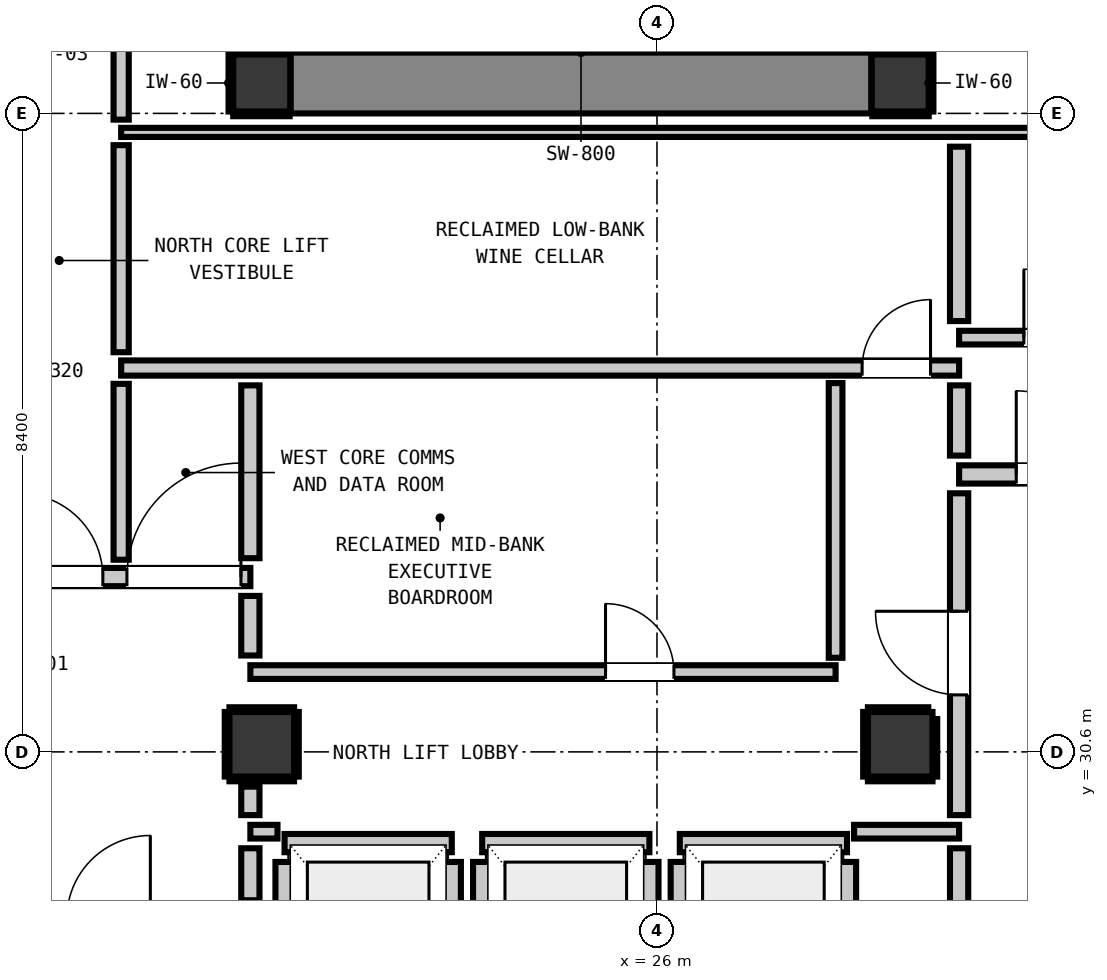
"""IFC4 building model, lengths in metres.
Left out: names, types, materials, properties, quantities, classifications, styles, units other than length and angle.
Written with IfcOpenShell. Run it as: python <this file> out.ifc"""

import sys

from ifc_helpers import new_model, si_unit, direction, frame, frame_2d, origin, origin_2d, place, context, subcontext, project, spatial, rectangle, extrude, element, fill, save


model = new_model("IFC4")
c1 = context("Model", 3, precision=1e-05, world=origin(), true_north=direction((0.0, 1.0)))
c2 = subcontext(c1, "Body", "Model", "MODEL_VIEW")
j1 = project(units=[si_unit("LENGTHUNIT", "METRE"), si_unit("PLANEANGLEUNIT", "RADIAN")], contexts=[c1])
p1 = place(None, origin())
s1 = spatial("IfcSite", under=j1, at=p1, CompositionType="ELEMENT")
p2 = place(p1, origin())
s2 = spatial("IfcBuilding", under=s1, at=p2, CompositionType="ELEMENT")
p3 = place(p2, frame((0.0, 0.0, 262.24)))
s3 = spatial("IfcBuildingStorey", under=s2, at=p3, CompositionType="ELEMENT", Elevation=262.24)
for number, where, z_axis, x_axis in (
    (1, (20.8, 39.4, 0.0), (0.0, 0.0, 1.0), (1.0, 0.0, 0.0)),
    (2, (29.2, 39.4, 0.0), (0.0, 0.0, 1.0), (1.0, 0.0, 0.0)),
):
    element("IfcColumn", number, at=place(p3, frame(where, z_axis=z_axis, x_axis=x_axis)), inside=s3, PredefinedType="COLUMN", context=c2, shape_type="SweptSolid", body=[
        extrude(rectangle(XDim=0.75, YDim=0.75, at=origin_2d()), origin(), (0.0, 0.0, 1.0), 3.32),
    ])
p4 = place(p3, frame((21.18, 39.4, 0.0), z_axis=(0.0, 0.0, 1.0), x_axis=(1.0, 0.0, 0.0)))
e3 = element("IfcWall", 3, at=p4, inside=s3, PredefinedType="SHEAR", context=c2, shape_type="SweptSolid", body=[
    extrude(rectangle(XDim=7.64, YDim=0.8, at=frame_2d((3.82, 0.0))), origin(), (0.0, 0.0, 1.0), 3.32),
])
for number, where, z_axis, x_axis in (
    (4, (20.8, 30.7, 0.0), (0.0, 0.0, 1.0), (1.0, 0.0, 0.0)),
    (5, (29.2, 30.7, 0.0), (0.0, 0.0, 1.0), (1.0, 0.0, 0.0)),
):
    element("IfcColumn", number, at=place(p3, frame(where, z_axis=z_axis, x_axis=x_axis)), inside=s3, PredefinedType="COLUMN", context=c2, shape_type="SweptSolid", body=[
        extrude(rectangle(XDim=0.85, YDim=0.85, at=origin_2d()), origin(), (0.0, 0.0, 1.0), 3.32),
    ])
p5 = place(p3, frame((21.1, 29.4, 0.0), z_axis=(0.0, 0.0, 1.0), x_axis=(1.0, 0.0, 0.0)))
e6 = element("IfcWall", 6, at=p5, inside=s3, PredefinedType="PARTITIONING", context=c2, shape_type="SweptSolid", body=[
    extrude(rectangle(XDim=2.2, YDim=0.24, at=frame_2d((1.1, 0.0))), origin(), (0.0, 0.0, 1.0), 3.1),
])
p6 = place(p3, frame((21.1, 27.048, 0.0), z_axis=(0.0, 0.0, 1.0), x_axis=(0.0, 1.0, 0.0)))
e7 = element("IfcWall", 7, at=p6, inside=s3, PredefinedType="PARTITIONING", context=c2, shape_type="SweptSolid", body=[
    extrude(rectangle(XDim=2.104, YDim=0.24, at=frame_2d((1.052, 0.0))), origin(), (0.0, 0.0, 1.0), 2.335),
])
p7 = place(p3, frame((23.3, 27.048, 0.0), z_axis=(0.0, 0.0, 1.0), x_axis=(0.0, 1.0, 0.0)))
e8 = element("IfcWall", 8, at=p7, inside=s3, PredefinedType="PARTITIONING", context=c2, shape_type="SweptSolid", body=[
    extrude(rectangle(XDim=2.104, YDim=0.24, at=frame_2d((1.052, 0.0))), origin(), (0.0, 0.0, 1.0), 3.1),
])
p8 = place(p3, frame((23.7, 29.4, 0.0), z_axis=(0.0, 0.0, 1.0), x_axis=(1.0, 0.0, 0.0)))
e9 = element("IfcWall", 9, at=p8, inside=s3, PredefinedType="PARTITIONING", context=c2, shape_type="SweptSolid", body=[
    extrude(rectangle(XDim=2.2, YDim=0.24, at=frame_2d((1.1, 0.0))), origin(), (0.0, 0.0, 1.0), 3.1),
])
for number, where, z_axis, x_axis in (
    (10, (23.7, 27.048, 0.0), (0.0, 0.0, 1.0), (0.0, 1.0, 0.0)),
    (11, (25.9, 27.048, 0.0), (0.0, 0.0, 1.0), (0.0, 1.0, 0.0)),
):
    element("IfcWall", number, at=place(p3, frame(where, z_axis=z_axis, x_axis=x_axis)), inside=s3, PredefinedType="PARTITIONING", context=c2, shape_type="SweptSolid", body=[
        extrude(rectangle(XDim=2.104, YDim=0.24, at=frame_2d((1.052, 0.0))), origin(), (0.0, 0.0, 1.0), 3.1),
    ])
p9 = place(p3, frame((26.3, 29.4, 0.0), z_axis=(0.0, 0.0, 1.0), x_axis=(1.0, 0.0, 0.0)))
e12 = element("IfcWall", 12, at=p9, inside=s3, PredefinedType="PARTITIONING", context=c2, shape_type="SweptSolid", body=[
    extrude(rectangle(XDim=2.2, YDim=0.24, at=frame_2d((1.1, 0.0))), origin(), (0.0, 0.0, 1.0), 3.1),
])
p10 = place(p3, frame((26.3, 27.048, 0.0), z_axis=(0.0, 0.0, 1.0), x_axis=(0.0, 1.0, 0.0)))
e13 = element("IfcWall", 13, at=p10, inside=s3, PredefinedType="PARTITIONING", context=c2, shape_type="SweptSolid", body=[
    extrude(rectangle(XDim=2.104, YDim=0.24, at=frame_2d((1.052, 0.0))), origin(), (0.0, 0.0, 1.0), 3.1),
])
p11 = place(p3, frame((28.5, 27.33, 0.0), z_axis=(0.0, 0.0, 1.0), x_axis=(0.0, 1.0, 0.0)))
e14 = element("IfcWall", 14, at=p11, inside=s3, PredefinedType="PARTITIONING", context=c2, shape_type="SweptSolid", body=[
    extrude(rectangle(XDim=1.822, YDim=0.24, at=frame_2d((0.911, 0.0))), origin(), (0.0, 0.0, 1.0), 3.1),
])
p12 = place(p3, frame((17.45, 32.9, 0.0), z_axis=(0.0, 0.0, 1.0), x_axis=(1.0, 0.0, 0.0)))
e15 = element("IfcWall", 15, at=p12, inside=s3, PredefinedType="PARTITIONING", context=c2, shape_type="SweptSolid", body=[
    extrude(rectangle(XDim=3.2, YDim=0.24, at=frame_2d((1.6, 0.0))), origin(), (0.0, 0.0, 1.0), 3.1),
])
p13 = place(p12, frame((0.159, 0.0, 0.0)))
e16 = element("IfcOpeningElement", 16, at=p13, cuts=e15, PredefinedType="OPENING", context=c2, shape_type="SweptSolid", body=[
    extrude(rectangle(XDim=1.1, YDim=2.15, at=frame_2d((0.55, 1.075))), frame((0.0, 0.13, 0.0), z_axis=(0.0, -1.0, 0.0), x_axis=(1.0, 0.0, 0.0)), (0.0, 0.0, 1.0), 0.26),
])
p14 = place(p12, frame((1.576, 0.0, 0.0)))
e17 = element("IfcOpeningElement", 17, at=p14, cuts=e15, PredefinedType="OPENING", context=c2, shape_type="SweptSolid", body=[
    extrude(rectangle(XDim=1.5, YDim=2.15, at=frame_2d((0.75, 1.075))), frame((0.0, 0.13, 0.0), z_axis=(0.0, -1.0, 0.0), x_axis=(1.0, 0.0, 0.0)), (0.0, 0.0, 1.0), 0.26),
])
p15 = place(p3, frame((29.975, 34.25, 0.0), z_axis=(0.0, 0.0, 1.0), x_axis=(1.0, 0.0, 0.0)))
e18 = element("IfcWall", 18, at=p15, inside=s3, PredefinedType="PARTITIONING", context=c2, shape_type="SweptSolid", body=[
    extrude(rectangle(XDim=2.475, YDim=0.24, at=frame_2d((1.237, 0.0))), origin(), (0.0, 0.0, 1.0), 3.1),
])
p16 = place(p15, frame((0.752, 0.0, 0.0)))
e19 = element("IfcOpeningElement", 19, at=p16, cuts=e18, PredefinedType="OPENING", context=c2, shape_type="SweptSolid", body=[
    extrude(rectangle(XDim=1.1, YDim=2.15, at=frame_2d((0.55, 1.075))), frame((0.0, 0.13, 0.0), z_axis=(0.0, -1.0, 0.0), x_axis=(1.0, 0.0, 0.0)), (0.0, 0.0, 1.0), 0.26),
])
p17 = place(p3, frame((18.95, 35.65, 0.0), z_axis=(0.0, 0.0, 1.0), x_axis=(1.0, 0.0, 0.0)))
e20 = element("IfcWall", 20, at=p17, inside=s3, PredefinedType="PARTITIONING", context=c2, shape_type="SweptSolid", body=[
    extrude(rectangle(XDim=11.025, YDim=0.2, at=frame_2d((5.513, 0.0))), origin(), (0.0, 0.0, 1.0), 3.1),
])
p18 = place(p17, frame((9.749, 0.0, 0.0)))
e21 = element("IfcOpeningElement", 21, at=p18, cuts=e20, PredefinedType="OPENING", context=c2, shape_type="SweptSolid", body=[
    extrude(rectangle(XDim=0.9, YDim=2.1, at=frame_2d((0.45, 1.05))), frame((0.0, 0.11, 0.0), z_axis=(0.0, -1.0, 0.0), x_axis=(1.0, 0.0, 0.0)), (0.0, 0.0, 1.0), 0.22),
])
p19 = place(p3, frame((20.65, 29.55, 0.0), z_axis=(0.0, 0.0, 1.0), x_axis=(1.0, 0.0, 0.0)))
e22 = element("IfcWall", 22, at=p19, inside=s3, PredefinedType="PARTITIONING", context=c2, shape_type="SweptSolid", body=[
    extrude(rectangle(XDim=0.357, YDim=0.18, at=frame_2d((0.179, 0.0))), origin(), (0.0, 0.0, 1.0), 3.1),
])
p20 = place(p3, frame((28.593, 29.55, 0.0), z_axis=(0.0, 0.0, 1.0), x_axis=(1.0, 0.0, 0.0)))
e23 = element("IfcWall", 23, at=p20, inside=s3, PredefinedType="PARTITIONING", context=c2, shape_type="SweptSolid", body=[
    extrude(rectangle(XDim=1.382, YDim=0.18, at=frame_2d((0.691, 0.0))), origin(), (0.0, 0.0, 1.0), 3.1),
])
p21 = place(p3, frame((20.65, 31.65, 0.0), z_axis=(0.0, 0.0, 1.0), x_axis=(1.0, 0.0, 0.0)))
e24 = element("IfcWall", 24, at=p21, inside=s3, PredefinedType="PARTITIONING", context=c2, shape_type="SweptSolid", body=[
    extrude(rectangle(XDim=7.7, YDim=0.18, at=frame_2d((3.85, 0.0))), origin(), (0.0, 0.0, 1.0), 3.1),
])
p22 = place(p21, frame((4.673, 0.0, 0.0)))
e25 = element("IfcOpeningElement", 25, at=p22, cuts=e24, PredefinedType="OPENING", context=c2, shape_type="SweptSolid", body=[
    extrude(rectangle(XDim=0.9, YDim=2.1, at=frame_2d((0.45, 1.05))), frame((0.0, 0.1, 0.0), z_axis=(0.0, -1.0, 0.0), x_axis=(1.0, 0.0, 0.0)), (0.0, 0.0, 1.0), 0.2),
])
p23 = place(p3, frame((29.975, 36.05, 0.0), z_axis=(0.0, 0.0, 1.0), x_axis=(1.0, 0.0, 0.0)))
e26 = element("IfcWall", 26, at=p23, inside=s3, PredefinedType="PARTITIONING", context=c2, shape_type="SweptSolid", body=[
    extrude(rectangle(XDim=2.505, YDim=0.18, at=frame_2d((1.252, 0.0))), origin(), (0.0, 0.0, 1.0), 3.1),
])
p24 = place(p23, frame((0.852, 0.0, 0.0)))
e27 = element("IfcOpeningElement", 27, at=p24, cuts=e26, PredefinedType="OPENING", context=c2, shape_type="SweptSolid", body=[
    extrude(rectangle(XDim=0.9, YDim=2.1, at=frame_2d((0.45, 1.05))), frame((0.0, 0.1, 0.0), z_axis=(0.0, -1.0, 0.0), x_axis=(1.0, 0.0, 0.0)), (0.0, 0.0, 1.0), 0.2),
])
p25 = place(p3, frame((18.95, 38.75, 0.0), z_axis=(0.0, 0.0, 1.0), x_axis=(1.0, 0.0, 0.0)))
e28 = element("IfcWall", 28, at=p25, inside=s3, PredefinedType="PARTITIONING", context=c2, shape_type="SweptSolid", body=[
    extrude(rectangle(XDim=13.56, YDim=0.12, at=frame_2d((6.78, 0.0))), origin(), (0.0, 0.0, 1.0), 3.1),
])
p26 = place(p3, frame((20.65, 28.648, 0.0), z_axis=(0.0, 0.0, 1.0), x_axis=(0.0, 1.0, 0.0)))
e29 = element("IfcWall", 29, at=p26, inside=s3, PredefinedType="PARTITIONING", context=c2, shape_type="SweptSolid", body=[
    extrude(rectangle(XDim=0.684, YDim=0.24, at=frame_2d((0.342, 0.0))), origin(), (0.0, 0.0, 1.0), 2.335),
])
p27 = place(p3, frame((20.65, 29.768, 0.0), z_axis=(0.0, 0.0, 1.0), x_axis=(0.0, 1.0, 0.0)))
e30 = element("IfcWall", 30, at=p27, inside=s3, PredefinedType="PARTITIONING", context=c2, shape_type="SweptSolid", body=[
    extrude(rectangle(XDim=0.375, YDim=0.24, at=frame_2d((0.188, 0.0))), origin(), (0.0, 0.0, 1.0), 2.335),
])
p28 = place(p3, frame((20.65, 31.868, 0.0), z_axis=(0.0, 0.0, 1.0), x_axis=(0.0, 1.0, 0.0)))
e31 = element("IfcWall", 31, at=p28, inside=s3, PredefinedType="PARTITIONING", context=c2, shape_type="SweptSolid", body=[
    extrude(rectangle(XDim=0.784, YDim=0.24, at=frame_2d((0.392, 0.0))), origin(), (0.0, 0.0, 1.0), 2.335),
])
p29 = place(p3, frame((20.65, 33.148, 0.0), z_axis=(0.0, 0.0, 1.0), x_axis=(0.0, 1.0, 0.0)))
e32 = element("IfcWall", 32, at=p29, inside=s3, PredefinedType="PARTITIONING", context=c2, shape_type="SweptSolid", body=[
    extrude(rectangle(XDim=2.274, YDim=0.24, at=frame_2d((1.137, 0.0))), origin(), (0.0, 0.0, 1.0), 2.335),
])
p30 = place(p3, frame((29.975, 25.648, 0.0), z_axis=(0.0, 0.0, 1.0), x_axis=(0.0, 1.0, 0.0)))
e33 = element("IfcWall", 33, at=p30, inside=s3, PredefinedType="PARTITIONING", context=c2, shape_type="SweptSolid", body=[
    extrude(rectangle(XDim=3.684, YDim=0.24, at=frame_2d((1.842, 0.0))), origin(), (0.0, 0.0, 1.0), 3.1),
])
p31 = place(p3, frame((29.975, 29.768, 0.0), z_axis=(0.0, 0.0, 1.0), x_axis=(0.0, 1.0, 0.0)))
e34 = element("IfcWall", 34, at=p31, inside=s3, PredefinedType="PARTITIONING", context=c2, shape_type="SweptSolid", body=[
    extrude(rectangle(XDim=4.234, YDim=0.24, at=frame_2d((2.117, 0.0))), origin(), (0.0, 0.0, 1.0), 3.1),
])
p32 = place(p31, frame((1.582, 0.0, 0.0)))
e35 = element("IfcOpeningElement", 35, at=p32, cuts=e34, PredefinedType="OPENING", context=c2, shape_type="SweptSolid", body=[
    extrude(rectangle(XDim=1.1, YDim=2.15, at=frame_2d((0.55, 1.075))), frame((0.0, 0.13, 0.0), z_axis=(0.0, -1.0, 0.0), x_axis=(1.0, 0.0, 0.0)), (0.0, 0.0, 1.0), 0.26),
])
p33 = place(p3, frame((29.975, 34.498, 0.0), z_axis=(0.0, 0.0, 1.0), x_axis=(0.0, 1.0, 0.0)))
e36 = element("IfcWall", 36, at=p33, inside=s3, PredefinedType="PARTITIONING", context=c2, shape_type="SweptSolid", body=[
    extrude(rectangle(XDim=0.924, YDim=0.24, at=frame_2d((0.462, 0.0))), origin(), (0.0, 0.0, 1.0), 3.1),
])
p34 = place(p3, frame((29.975, 36.268, 0.0), z_axis=(0.0, 0.0, 1.0), x_axis=(0.0, 1.0, 0.0)))
e37 = element("IfcWall", 37, at=p34, inside=s3, PredefinedType="PARTITIONING", context=c2, shape_type="SweptSolid", body=[
    extrude(rectangle(XDim=2.294, YDim=0.24, at=frame_2d((1.147, 0.0))), origin(), (0.0, 0.0, 1.0), 3.1),
])
p35 = place(p3, frame((18.95, 33.128, 0.0), z_axis=(0.0, 0.0, 1.0), x_axis=(0.0, 1.0, 0.0)))
e38 = element("IfcWall", 38, at=p35, inside=s3, PredefinedType="PARTITIONING", context=c2, shape_type="SweptSolid", body=[
    extrude(rectangle(XDim=2.314, YDim=0.2, at=frame_2d((1.157, 0.0))), origin(), (0.0, 0.0, 1.0), 3.1),
])
p36 = place(p3, frame((18.95, 35.858, 0.0), z_axis=(0.0, 0.0, 1.0), x_axis=(0.0, 1.0, 0.0)))
e39 = element("IfcWall", 39, at=p36, inside=s3, PredefinedType="PARTITIONING", context=c2, shape_type="SweptSolid", body=[
    extrude(rectangle(XDim=2.724, YDim=0.2, at=frame_2d((1.362, 0.0))), origin(), (0.0, 0.0, 1.0), 3.1),
])
p37 = place(p3, frame((18.95, 38.918, 0.0), z_axis=(0.0, 0.0, 1.0), x_axis=(0.0, 1.0, 0.0)))
e40 = element("IfcWall", 40, at=p37, inside=s3, PredefinedType="PARTITIONING", context=c2, shape_type="SweptSolid", body=[
    extrude(rectangle(XDim=1.134, YDim=0.2, at=frame_2d((0.567, 0.0))), origin(), (0.0, 0.0, 1.0), 3.1),
])
p38 = place(p3, frame((28.35, 31.838, 0.0), z_axis=(0.0, 0.0, 1.0), x_axis=(0.0, 1.0, 0.0)))
e41 = element("IfcWall", 41, at=p38, inside=s3, PredefinedType="PARTITIONING", context=c2, shape_type="SweptSolid", body=[
    extrude(rectangle(XDim=3.614, YDim=0.18, at=frame_2d((1.807, 0.0))), origin(), (0.0, 0.0, 1.0), 3.1),
])
for number, where, z_axis, x_axis in (
    (42, (20.425, 38.993, 0.0), (0.0, 0.0, 1.0), (1.0, 0.0, 0.0)),
    (43, (20.425, 39.807, 0.0), (0.0, 0.0, 1.0), (1.0, 0.0, 0.0)),
):
    element("IfcWall", number, at=place(p3, frame(where, z_axis=z_axis, x_axis=x_axis)), inside=s3, PredefinedType="PARTITIONING", context=c2, shape_type="SweptSolid", body=[
        extrude(rectangle(XDim=0.742, YDim=0.06, at=frame_2d((0.371, 0.0))), origin(), (0.0, 0.0, 1.0), 1.45),
    ])
p39 = place(p3, frame((20.393, 39.025, 0.0), z_axis=(0.0, 0.0, 1.0), x_axis=(0.0, 1.0, 0.0)))
e44 = element("IfcWall", 44, at=p39, inside=s3, PredefinedType="PARTITIONING", context=c2, shape_type="SweptSolid", body=[
    extrude(rectangle(XDim=0.75, YDim=0.06, at=frame_2d((0.375, 0.0))), origin(), (0.0, 0.0, 1.0), 1.45),
])
for number, where, z_axis, x_axis in (
    (45, (28.833, 38.993, 0.0), (0.0, 0.0, 1.0), (1.0, 0.0, 0.0)),
    (46, (28.833, 39.807, 0.0), (0.0, 0.0, 1.0), (1.0, 0.0, 0.0)),
):
    element("IfcWall", number, at=place(p3, frame(where, z_axis=z_axis, x_axis=x_axis)), inside=s3, PredefinedType="PARTITIONING", context=c2, shape_type="SweptSolid", body=[
        extrude(rectangle(XDim=0.742, YDim=0.06, at=frame_2d((0.371, 0.0))), origin(), (0.0, 0.0, 1.0), 1.45),
    ])
p40 = place(p3, frame((29.607, 39.025, 0.0), z_axis=(0.0, 0.0, 1.0), x_axis=(0.0, 1.0, 0.0)))
e47 = element("IfcWall", 47, at=p40, inside=s3, PredefinedType="PARTITIONING", context=c2, shape_type="SweptSolid", body=[
    extrude(rectangle(XDim=0.75, YDim=0.06, at=frame_2d((0.375, 0.0))), origin(), (0.0, 0.0, 1.0), 1.45),
])
for number, where, z_axis, x_axis in (
    (48, (20.375, 30.243, 0.0), (0.0, 0.0, 1.0), (1.0, 0.0, 0.0)),
    (49, (20.375, 31.157, 0.0), (0.0, 0.0, 1.0), (1.0, 0.0, 0.0)),
    (50, (20.343, 30.275, 0.0), (0.0, 0.0, 1.0), (0.0, 1.0, 0.0)),
    (51, (21.257, 30.275, 0.0), (0.0, 0.0, 1.0), (0.0, 1.0, 0.0)),
    (52, (28.775, 30.243, 0.0), (0.0, 0.0, 1.0), (1.0, 0.0, 0.0)),
):
    element("IfcWall", number, at=place(p3, frame(where, z_axis=z_axis, x_axis=x_axis)), inside=s3, PredefinedType="PARTITIONING", context=c2, shape_type="SweptSolid", body=[
        extrude(rectangle(XDim=0.85, YDim=0.06, at=frame_2d((0.425, 0.0))), origin(), (0.0, 0.0, 1.0), 1.45),
    ])
p41 = place(p3, frame((28.775, 31.157, 0.0), z_axis=(0.0, 0.0, 1.0), x_axis=(1.0, 0.0, 0.0)))
e53 = element("IfcWall", 53, at=p41, inside=s3, PredefinedType="PARTITIONING", context=c2, shape_type="SweptSolid", body=[
    extrude(rectangle(XDim=0.794, YDim=0.06, at=frame_2d((0.397, 0.0))), origin(), (0.0, 0.0, 1.0), 1.45),
])
p42 = place(p3, frame((28.743, 30.275, 0.0), z_axis=(0.0, 0.0, 1.0), x_axis=(0.0, 1.0, 0.0)))
e54 = element("IfcWall", 54, at=p42, inside=s3, PredefinedType="PARTITIONING", context=c2, shape_type="SweptSolid", body=[
    extrude(rectangle(XDim=0.85, YDim=0.06, at=frame_2d((0.425, 0.0))), origin(), (0.0, 0.0, 1.0), 1.45),
])
p43 = place(p3, frame((29.657, 30.275, 0.0), z_axis=(0.0, 0.0, 1.0), x_axis=(0.0, 1.0, 0.0)))
e55 = element("IfcWall", 55, at=p43, inside=s3, PredefinedType="PARTITIONING", context=c2, shape_type="SweptSolid", body=[
    extrude(rectangle(XDim=0.757, YDim=0.06, at=frame_2d((0.378, 0.0))), origin(), (0.0, 0.0, 1.0), 1.45),
])
p44 = place(p13, origin())
e56 = element("IfcDoor", 56, at=p44, inside=s3, OperationType="SINGLE_SWING_LEFT", PredefinedType="DOOR", context=c2, shape_type="SweptSolid", body=[
    extrude(rectangle(XDim=1.1, YDim=2.15, at=frame_2d((0.55, 1.075))), frame((0.0, 0.025, 0.0), z_axis=(0.0, -1.0, 0.0), x_axis=(1.0, 0.0, 0.0)), (0.0, 0.0, 1.0), 0.05),
])
fill(e16, e56)
p45 = place(p32, origin())
e57 = element("IfcDoor", 57, at=p45, inside=s3, OperationType="SINGLE_SWING_RIGHT", PredefinedType="DOOR", context=c2, shape_type="SweptSolid", body=[
    extrude(rectangle(XDim=1.1, YDim=2.15, at=frame_2d((0.55, 1.075))), frame((0.0, 0.025, 0.0), z_axis=(0.0, -1.0, 0.0), x_axis=(1.0, 0.0, 0.0)), (0.0, 0.0, 1.0), 0.05),
])
fill(e35, e57)
p46 = place(p16, origin())
e58 = element("IfcDoor", 58, at=p46, inside=s3, OperationType="SINGLE_SWING_LEFT", PredefinedType="DOOR", context=c2, shape_type="SweptSolid", body=[
    extrude(rectangle(XDim=1.1, YDim=2.15, at=frame_2d((0.55, 1.075))), frame((0.0, 0.025, 0.0), z_axis=(0.0, -1.0, 0.0), x_axis=(1.0, 0.0, 0.0)), (0.0, 0.0, 1.0), 0.05),
])
fill(e19, e58)
p47 = place(p14, origin())
e59 = element("IfcDoor", 59, at=p47, inside=s3, OperationType="SINGLE_SWING_RIGHT", PredefinedType="DOOR", context=c2, shape_type="SweptSolid", body=[
    extrude(rectangle(XDim=1.5, YDim=2.15, at=frame_2d((0.75, 1.075))), frame((0.0, 0.025, 0.0), z_axis=(0.0, -1.0, 0.0), x_axis=(1.0, 0.0, 0.0)), (0.0, 0.0, 1.0), 0.05),
])
fill(e17, e59)
p48 = place(p24, origin())
e60 = element("IfcDoor", 60, at=p48, inside=s3, OperationType="SINGLE_SWING_LEFT", PredefinedType="DOOR", context=c2, shape_type="SweptSolid", body=[
    extrude(rectangle(XDim=0.9, YDim=2.1, at=frame_2d((0.45, 1.05))), frame((0.0, 0.025, 0.0), z_axis=(0.0, -1.0, 0.0), x_axis=(1.0, 0.0, 0.0)), (0.0, 0.0, 1.0), 0.05),
])
fill(e27, e60)
p49 = place(p18, origin())
e61 = element("IfcDoor", 61, at=p49, inside=s3, OperationType="SINGLE_SWING_RIGHT", PredefinedType="DOOR", context=c2, shape_type="SweptSolid", body=[
    extrude(rectangle(XDim=0.9, YDim=2.1, at=frame_2d((0.45, 1.05))), frame((0.0, 0.025, 0.0), z_axis=(0.0, -1.0, 0.0), x_axis=(1.0, 0.0, 0.0)), (0.0, 0.0, 1.0), 0.05),
])
fill(e21, e61)
p50 = place(p22, origin())
e62 = element("IfcDoor", 62, at=p50, inside=s3, OperationType="SINGLE_SWING_LEFT", PredefinedType="DOOR", context=c2, shape_type="SweptSolid", body=[
    extrude(rectangle(XDim=0.9, YDim=2.1, at=frame_2d((0.45, 1.05))), frame((0.0, 0.025, 0.0), z_axis=(0.0, -1.0, 0.0), x_axis=(1.0, 0.0, 0.0)), (0.0, 0.0, 1.0), 0.05),
])
fill(e25, e62)
save(model, sys.argv[1])
